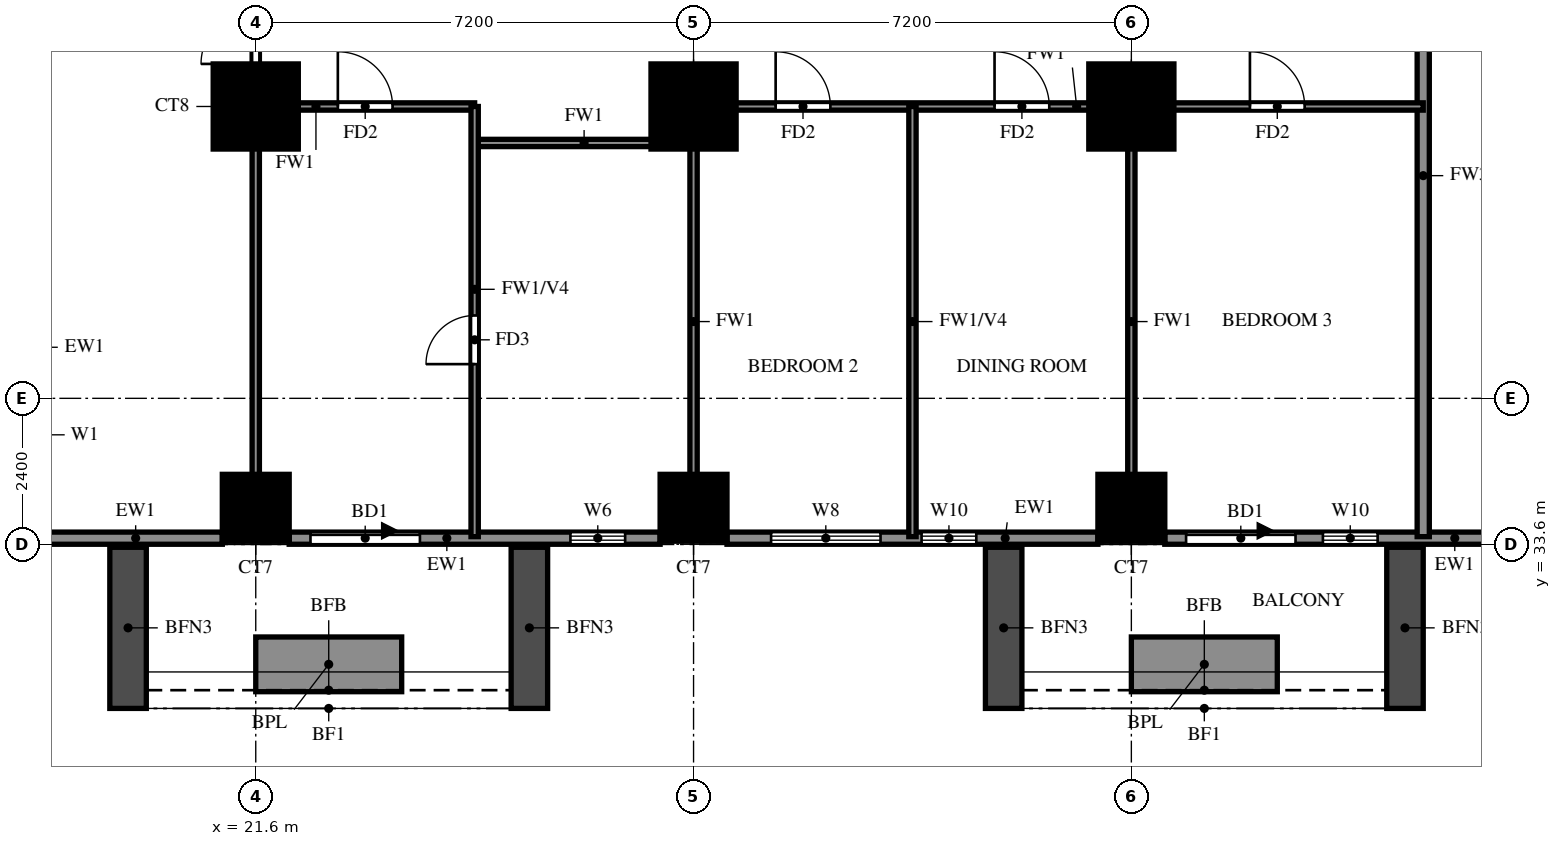
"""IFC4 building model, lengths in metres.
Left out: names, types, materials, properties, quantities, classifications, styles, units other than length and angle.
Written with IfcOpenShell. Run it as: python <this file> out.ifc"""

import sys

from ifc_helpers import new_model, si_unit, direction, frame, frame_2d, origin, origin_2d, place, context, subcontext, project, spatial, rectangle, extrude, source, transform, mapped, element, fill, save


model = new_model("IFC4")
c1 = context("Model", 3, precision=1e-05, world=origin(), true_north=direction((0.0, 1.0)))
c2 = subcontext(c1, "Body", "Model", "MODEL_VIEW")
j1 = project(units=[si_unit("LENGTHUNIT", "METRE"), si_unit("PLANEANGLEUNIT", "RADIAN")], contexts=[c1])
p1 = place(None, origin())
s1 = spatial("IfcSite", under=j1, at=p1, CompositionType="ELEMENT")
p2 = place(p1, origin())
s2 = spatial("IfcBuilding", under=s1, at=p2, CompositionType="ELEMENT")
p3 = place(p2, frame((0.0, 0.0, 41.0)))
s3 = spatial("IfcBuildingStorey", under=s2, at=p3, CompositionType="ELEMENT", Elevation=41.0)
m1 = source(origin(), c2, "Body", "SweptSolid", [
    extrude(rectangle(XDim=1.1, YDim=1.1, at=origin_2d()), origin(), (0.0, 0.0, 1.0), 3.18),
])
for number, where, z_axis, x_axis in (
    (1, (21.6, 34.2, 0.0), (0.0, 0.0, 1.0), (1.0, 0.0, 0.0)),
    (2, (28.8, 34.2, 0.0), (0.0, 0.0, 1.0), (1.0, 0.0, 0.0)),
    (3, (36.0, 34.2, 0.0), (0.0, 0.0, 1.0), (1.0, 0.0, 0.0)),
):
    element("IfcColumn", number, at=place(p3, frame(where, z_axis=z_axis, x_axis=x_axis)), inside=s3, PredefinedType="COLUMN", context=c2, shape_type="MappedRepresentation", body=[
        mapped(m1, transform((0.0, 0.0, 0.0))),
    ])
m2 = source(origin(), c2, "Body", "SweptSolid", [
    extrude(rectangle(XDim=1.4, YDim=1.4, at=origin_2d()), origin(), (0.0, 0.0, 1.0), 3.18),
])
for number, where, z_axis, x_axis in (
    (4, (21.6, 40.8, 0.0), (0.0, 0.0, 1.0), (1.0, 0.0, 0.0)),
    (5, (28.8, 40.8, 0.0), (0.0, 0.0, 1.0), (1.0, 0.0, 0.0)),
    (6, (36.0, 40.8, 0.0), (0.0, 0.0, 1.0), (1.0, 0.0, 0.0)),
):
    element("IfcColumn", number, at=place(p3, frame(where, z_axis=z_axis, x_axis=x_axis)), inside=s3, PredefinedType="COLUMN", context=c2, shape_type="MappedRepresentation", body=[
        mapped(m2, transform((0.0, 0.0, 0.0))),
    ])
p4 = place(p3, frame((18.2, 33.7, 0.0), z_axis=(0.0, 0.0, 1.0), x_axis=(1.0, 0.0, 0.0)))
e7 = element("IfcWall", 7, at=p4, inside=s3, PredefinedType="SOLIDWALL", context=c2, shape_type="SweptSolid", body=[
    extrude(rectangle(XDim=2.85, YDim=0.2, at=frame_2d((1.425, 0.0))), origin(), (0.0, 0.0, 1.0), 3.18),
])
p5 = place(p3, frame((22.15, 33.7, 0.0), z_axis=(0.0, 0.0, 1.0), x_axis=(1.0, 0.0, 0.0)))
e8 = element("IfcWall", 8, at=p5, inside=s3, PredefinedType="SOLIDWALL", context=c2, shape_type="SweptSolid", body=[
    extrude(rectangle(XDim=6.1, YDim=0.2, at=frame_2d((3.05, 0.0))), origin(), (0.0, 0.0, 1.0), 3.18),
])
p6 = place(p5, frame((0.35, 0.0, 0.0)))
e9 = element("IfcOpeningElement", 9, at=p6, cuts=e8, PredefinedType="OPENING", context=c2, shape_type="SweptSolid", body=[
    extrude(rectangle(XDim=1.8, YDim=2.4, at=frame_2d((0.9, 1.2))), frame((0.0, 0.11, 0.0), z_axis=(0.0, -1.0, 0.0), x_axis=(1.0, 0.0, 0.0)), (0.0, 0.0, 1.0), 0.22),
])
p7 = place(p5, frame((4.625, 0.0, 1.5)))
e10 = element("IfcOpeningElement", 10, at=p7, cuts=e8, PredefinedType="OPENING", context=c2, shape_type="SweptSolid", body=[
    extrude(rectangle(XDim=0.9, YDim=0.9, at=frame_2d((0.45, 0.45))), frame((0.0, 0.11, 0.0), z_axis=(0.0, -1.0, 0.0), x_axis=(1.0, 0.0, 0.0)), (0.0, 0.0, 1.0), 0.22),
])
p8 = place(p3, frame((29.35, 33.7, 0.0), z_axis=(0.0, 0.0, 1.0), x_axis=(1.0, 0.0, 0.0)))
e11 = element("IfcWall", 11, at=p8, inside=s3, PredefinedType="SOLIDWALL", context=c2, shape_type="SweptSolid", body=[
    extrude(rectangle(XDim=6.1, YDim=0.2, at=frame_2d((3.05, 0.0))), origin(), (0.0, 0.0, 1.0), 3.18),
])
p9 = place(p8, frame((0.725, 0.0, 0.6)))
e12 = element("IfcOpeningElement", 12, at=p9, cuts=e11, PredefinedType="OPENING", context=c2, shape_type="SweptSolid", body=[
    extrude(rectangle(XDim=1.8, YDim=2.4, at=frame_2d((0.9, 1.2))), frame((0.0, 0.11, 0.0), z_axis=(0.0, -1.0, 0.0), x_axis=(1.0, 0.0, 0.0)), (0.0, 0.0, 1.0), 0.22),
])
p10 = place(p8, frame((3.2, 0.0, 0.6)))
e13 = element("IfcOpeningElement", 13, at=p10, cuts=e11, PredefinedType="OPENING", context=c2, shape_type="SweptSolid", body=[
    extrude(rectangle(XDim=0.9, YDim=2.4, at=frame_2d((0.45, 1.2))), frame((0.0, 0.11, 0.0), z_axis=(0.0, -1.0, 0.0), x_axis=(1.0, 0.0, 0.0)), (0.0, 0.0, 1.0), 0.22),
])
p11 = place(p3, frame((36.55, 33.7, 0.0), z_axis=(0.0, 0.0, 1.0), x_axis=(1.0, 0.0, 0.0)))
e14 = element("IfcWall", 14, at=p11, inside=s3, PredefinedType="SOLIDWALL", context=c2, shape_type="SweptSolid", body=[
    extrude(rectangle(XDim=5.45, YDim=0.2, at=frame_2d((2.725, 0.0))), origin(), (0.0, 0.0, 1.0), 3.18),
])
p12 = place(p11, frame((0.35, 0.0, 0.0)))
e15 = element("IfcOpeningElement", 15, at=p12, cuts=e14, PredefinedType="OPENING", context=c2, shape_type="SweptSolid", body=[
    extrude(rectangle(XDim=1.8, YDim=2.4, at=frame_2d((0.9, 1.2))), frame((0.0, 0.11, 0.0), z_axis=(0.0, -1.0, 0.0), x_axis=(1.0, 0.0, 0.0)), (0.0, 0.0, 1.0), 0.22),
])
p13 = place(p11, frame((2.6, 0.0, 0.6)))
e16 = element("IfcOpeningElement", 16, at=p13, cuts=e14, PredefinedType="OPENING", context=c2, shape_type="SweptSolid", body=[
    extrude(rectangle(XDim=0.9, YDim=2.4, at=frame_2d((0.45, 1.2))), frame((0.0, 0.11, 0.0), z_axis=(0.0, -1.0, 0.0), x_axis=(1.0, 0.0, 0.0)), (0.0, 0.0, 1.0), 0.22),
])
for number, where, z_axis, x_axis in (
    (17, (19.5, 33.55, 0.0), (0.0, 0.0, 1.0), (0.0, -1.0, 0.0)),
    (18, (26.1, 33.55, 0.0), (0.0, 0.0, 1.0), (0.0, -1.0, 0.0)),
):
    element("IfcWall", number, at=place(p3, frame(where, z_axis=z_axis, x_axis=x_axis)), inside=s3, PredefinedType="SOLIDWALL", context=c2, shape_type="SweptSolid", body=[
        extrude(rectangle(XDim=2.65, YDim=0.6, at=frame_2d((1.325, 0.0))), origin(), (0.0, 0.0, 1.0), 2.85),
    ])
p14 = place(p3, frame((21.6, 31.625, 0.0), z_axis=(0.0, 0.0, 1.0), x_axis=(1.0, 0.0, 0.0)))
e19 = element("IfcWall", 19, at=p14, inside=s3, PredefinedType="SOLIDWALL", context=c2, shape_type="SweptSolid", body=[
    extrude(rectangle(XDim=2.4, YDim=0.9, at=frame_2d((1.2, 0.0))), origin(), (0.0, 0.0, 1.0), 0.9),
])
for number, where, z_axis, x_axis in (
    (20, (33.9, 33.55, 0.0), (0.0, 0.0, 1.0), (0.0, -1.0, 0.0)),
    (21, (40.5, 33.55, 0.0), (0.0, 0.0, 1.0), (0.0, -1.0, 0.0)),
):
    element("IfcWall", number, at=place(p3, frame(where, z_axis=z_axis, x_axis=x_axis)), inside=s3, PredefinedType="SOLIDWALL", context=c2, shape_type="SweptSolid", body=[
        extrude(rectangle(XDim=2.65, YDim=0.6, at=frame_2d((1.325, 0.0))), origin(), (0.0, 0.0, 1.0), 2.85),
    ])
p15 = place(p3, frame((36.0, 31.625, 0.0), z_axis=(0.0, 0.0, 1.0), x_axis=(1.0, 0.0, 0.0)))
e22 = element("IfcWall", 22, at=p15, inside=s3, PredefinedType="SOLIDWALL", context=c2, shape_type="SweptSolid", body=[
    extrude(rectangle(XDim=2.4, YDim=0.9, at=frame_2d((1.2, 0.0))), origin(), (0.0, 0.0, 1.0), 0.9),
])
p16 = place(p3, frame((40.8, 33.725, 0.0), z_axis=(0.0, 0.0, 1.0), x_axis=(0.0, 1.0, 0.0)))
e23 = element("IfcWall", 23, at=p16, inside=s3, PredefinedType="SOLIDWALL", context=c2, shape_type="SweptSolid", body=[
    extrude(rectangle(XDim=11.875, YDim=0.2, at=frame_2d((5.938, 0.0))), origin(), (0.0, 0.0, 1.0), 2.28),
])
p17 = place(p3, frame((25.2, 40.2, 0.0), z_axis=(0.0, 0.0, 1.0), x_axis=(1.0, 0.0, 0.0)))
e24 = element("IfcWall", 24, at=p17, inside=s3, PredefinedType="PARTITIONING", context=c2, shape_type="SweptSolid", body=[
    extrude(rectangle(XDim=3.6, YDim=0.12, at=frame_2d((1.8, 0.0))), origin(), (0.0, 0.0, 1.0), 3.18),
])
p18 = place(p3, frame((21.6, 40.8, 0.0), z_axis=(0.0, 0.0, 1.0), x_axis=(1.0, 0.0, 0.0)))
e25 = element("IfcWall", 25, at=p18, inside=s3, PredefinedType="PARTITIONING", context=c2, shape_type="SweptSolid", body=[
    extrude(rectangle(XDim=3.6, YDim=0.12, at=frame_2d((1.8, 0.0))), origin(), (0.0, 0.0, 1.0), 3.18),
])
p19 = place(p18, frame((1.35, 0.0, 0.0)))
e26 = element("IfcOpeningElement", 26, at=p19, cuts=e25, PredefinedType="OPENING", context=c2, shape_type="SweptSolid", body=[
    extrude(rectangle(XDim=0.9, YDim=2.1, at=frame_2d((0.45, 1.05))), frame((0.0, 0.07, 0.0), z_axis=(0.0, -1.0, 0.0), x_axis=(1.0, 0.0, 0.0)), (0.0, 0.0, 1.0), 0.14),
])
p20 = place(p3, frame((28.8, 40.8, 0.0), z_axis=(0.0, 0.0, 1.0), x_axis=(1.0, 0.0, 0.0)))
e27 = element("IfcWall", 27, at=p20, inside=s3, PredefinedType="PARTITIONING", context=c2, shape_type="SweptSolid", body=[
    extrude(rectangle(XDim=12.0, YDim=0.12, at=frame_2d((6.0, 0.0))), origin(), (0.0, 0.0, 1.0), 3.18),
])
p21 = place(p20, frame((1.35, 0.0, 0.0)))
e28 = element("IfcOpeningElement", 28, at=p21, cuts=e27, PredefinedType="OPENING", context=c2, shape_type="SweptSolid", body=[
    extrude(rectangle(XDim=0.9, YDim=2.1, at=frame_2d((0.45, 1.05))), frame((0.0, 0.07, 0.0), z_axis=(0.0, -1.0, 0.0), x_axis=(1.0, 0.0, 0.0)), (0.0, 0.0, 1.0), 0.14),
])
p22 = place(p20, frame((4.95, 0.0, 0.0)))
e29 = element("IfcOpeningElement", 29, at=p22, cuts=e27, PredefinedType="OPENING", context=c2, shape_type="SweptSolid", body=[
    extrude(rectangle(XDim=0.9, YDim=2.1, at=frame_2d((0.45, 1.05))), frame((0.0, 0.07, 0.0), z_axis=(0.0, -1.0, 0.0), x_axis=(1.0, 0.0, 0.0)), (0.0, 0.0, 1.0), 0.14),
])
p23 = place(p20, frame((9.15, 0.0, 0.0)))
e30 = element("IfcOpeningElement", 30, at=p23, cuts=e27, PredefinedType="OPENING", context=c2, shape_type="SweptSolid", body=[
    extrude(rectangle(XDim=0.9, YDim=2.1, at=frame_2d((0.45, 1.05))), frame((0.0, 0.07, 0.0), z_axis=(0.0, -1.0, 0.0), x_axis=(1.0, 0.0, 0.0)), (0.0, 0.0, 1.0), 0.14),
])
p24 = place(p3, frame((21.6, 33.725, 0.0), z_axis=(0.0, 0.0, 1.0), x_axis=(0.0, 1.0, 0.0)))
e31 = element("IfcWall", 31, at=p24, inside=s3, PredefinedType="PARTITIONING", context=c2, shape_type="SweptSolid", body=[
    extrude(rectangle(XDim=35.875, YDim=0.12, at=frame_2d((17.938, 0.0))), origin(), (0.0, 0.0, 1.0), 3.18),
])
p25 = place(p24, frame((7.775, 0.0, 0.0)))
e32 = element("IfcOpeningElement", 32, at=p25, cuts=e31, PredefinedType="OPENING", context=c2, shape_type="SweptSolid", body=[
    extrude(rectangle(XDim=0.9, YDim=2.1, at=frame_2d((0.45, 1.05))), frame((0.0, 0.07, 0.0), z_axis=(0.0, -1.0, 0.0), x_axis=(1.0, 0.0, 0.0)), (0.0, 0.0, 1.0), 0.14),
])
p26 = place(p24, frame((15.625, 0.0, 0.0)))
e33 = element("IfcOpeningElement", 33, at=p26, cuts=e31, PredefinedType="OPENING", context=c2, shape_type="SweptSolid", body=[
    extrude(rectangle(XDim=0.9, YDim=2.1, at=frame_2d((0.45, 1.05))), frame((0.0, 0.07, 0.0), z_axis=(0.0, -1.0, 0.0), x_axis=(1.0, 0.0, 0.0)), (0.0, 0.0, 1.0), 0.14),
])
p27 = place(p24, frame((22.225, 0.0, 0.0)))
e34 = element("IfcOpeningElement", 34, at=p27, cuts=e31, PredefinedType="OPENING", context=c2, shape_type="SweptSolid", body=[
    extrude(rectangle(XDim=1.5, YDim=2.1, at=frame_2d((0.75, 1.05))), frame((0.0, 0.07, 0.0), z_axis=(0.0, -1.0, 0.0), x_axis=(1.0, 0.0, 0.0)), (0.0, 0.0, 1.0), 0.14),
])
p28 = place(p24, frame((26.425, 0.0, 0.0)))
e35 = element("IfcOpeningElement", 35, at=p28, cuts=e31, PredefinedType="OPENING", context=c2, shape_type="SweptSolid", body=[
    extrude(rectangle(XDim=0.9, YDim=2.1, at=frame_2d((0.45, 1.05))), frame((0.0, 0.07, 0.0), z_axis=(0.0, -1.0, 0.0), x_axis=(1.0, 0.0, 0.0)), (0.0, 0.0, 1.0), 0.14),
])
p29 = place(p24, frame((31.825, 0.0, 0.0)))
e36 = element("IfcOpeningElement", 36, at=p29, cuts=e31, PredefinedType="OPENING", context=c2, shape_type="SweptSolid", body=[
    extrude(rectangle(XDim=0.9, YDim=2.1, at=frame_2d((0.45, 1.05))), frame((0.0, 0.07, 0.0), z_axis=(0.0, -1.0, 0.0), x_axis=(1.0, 0.0, 0.0)), (0.0, 0.0, 1.0), 0.14),
])
p30 = place(p3, frame((25.2, 33.725, 0.0), z_axis=(0.0, 0.0, 1.0), x_axis=(0.0, 1.0, 0.0)))
e37 = element("IfcWall", 37, at=p30, inside=s3, PredefinedType="PARTITIONING", context=c2, shape_type="SweptSolid", body=[
    extrude(rectangle(XDim=7.075, YDim=0.12, at=frame_2d((3.538, 0.0))), origin(), (0.0, 0.0, 1.0), 2.28),
])
p31 = place(p30, frame((2.837, 0.0, 0.0)))
e38 = element("IfcOpeningElement", 38, at=p31, cuts=e37, PredefinedType="OPENING", context=c2, shape_type="SweptSolid", body=[
    extrude(rectangle(XDim=0.8, YDim=2.1, at=frame_2d((0.4, 1.05))), frame((0.0, 0.07, 0.0), z_axis=(0.0, -1.0, 0.0), x_axis=(1.0, 0.0, 0.0)), (0.0, 0.0, 1.0), 0.14),
])
p32 = place(p3, frame((28.8, 33.725, 0.0), z_axis=(0.0, 0.0, 1.0), x_axis=(0.0, 1.0, 0.0)))
e39 = element("IfcWall", 39, at=p32, inside=s3, PredefinedType="PARTITIONING", context=c2, shape_type="SweptSolid", body=[
    extrude(rectangle(XDim=7.075, YDim=0.12, at=frame_2d((3.538, 0.0))), origin(), (0.0, 0.0, 1.0), 3.18),
])
p33 = place(p3, frame((32.4, 33.725, 0.0), z_axis=(0.0, 0.0, 1.0), x_axis=(0.0, 1.0, 0.0)))
e40 = element("IfcWall", 40, at=p33, inside=s3, PredefinedType="PARTITIONING", context=c2, shape_type="SweptSolid", body=[
    extrude(rectangle(XDim=7.075, YDim=0.12, at=frame_2d((3.538, 0.0))), origin(), (0.0, 0.0, 1.0), 2.28),
])
p34 = place(p3, frame((36.0, 33.725, 0.0), z_axis=(0.0, 0.0, 1.0), x_axis=(0.0, 1.0, 0.0)))
e41 = element("IfcWall", 41, at=p34, inside=s3, PredefinedType="PARTITIONING", context=c2, shape_type="SweptSolid", body=[
    extrude(rectangle(XDim=7.075, YDim=0.12, at=frame_2d((3.538, 0.0))), origin(), (0.0, 0.0, 1.0), 3.18),
])
p35 = place(p6, origin())
e42 = element("IfcDoor", 42, at=p35, inside=s3, OperationType="DOUBLE_DOOR_SLIDING", PredefinedType="DOOR", context=c2, shape_type="SweptSolid", body=[
    extrude(rectangle(XDim=1.8, YDim=2.4, at=frame_2d((0.9, 1.2))), frame((0.0, 0.025, 0.0), z_axis=(0.0, -1.0, 0.0), x_axis=(1.0, 0.0, 0.0)), (0.0, 0.0, 1.0), 0.05),
])
fill(e9, e42)
p36 = place(p7, origin())
e43 = element("IfcWindow", 43, at=p36, inside=s3, PartitioningType="SINGLE_PANEL", PredefinedType="WINDOW", context=c2, shape_type="SweptSolid", body=[
    extrude(rectangle(XDim=0.9, YDim=0.9, at=frame_2d((0.45, 0.45))), frame((0.0, 0.03, 0.0), z_axis=(0.0, -1.0, 0.0), x_axis=(1.0, 0.0, 0.0)), (0.0, 0.0, 1.0), 0.06),
])
fill(e10, e43)
p37 = place(p9, origin())
e44 = element("IfcWindow", 44, at=p37, inside=s3, PartitioningType="DOUBLE_PANEL_VERTICAL", PredefinedType="WINDOW", context=c2, shape_type="SweptSolid", body=[
    extrude(rectangle(XDim=1.8, YDim=2.4, at=frame_2d((0.9, 1.2))), frame((0.0, 0.03, 0.0), z_axis=(0.0, -1.0, 0.0), x_axis=(1.0, 0.0, 0.0)), (0.0, 0.0, 1.0), 0.06),
])
fill(e12, e44)
p38 = place(p10, origin())
e45 = element("IfcWindow", 45, at=p38, inside=s3, PartitioningType="SINGLE_PANEL", PredefinedType="WINDOW", context=c2, shape_type="SweptSolid", body=[
    extrude(rectangle(XDim=0.9, YDim=2.4, at=frame_2d((0.45, 1.2))), frame((0.0, 0.03, 0.0), z_axis=(0.0, -1.0, 0.0), x_axis=(1.0, 0.0, 0.0)), (0.0, 0.0, 1.0), 0.06),
])
fill(e13, e45)
p39 = place(p12, origin())
e46 = element("IfcDoor", 46, at=p39, inside=s3, OperationType="DOUBLE_DOOR_SLIDING", PredefinedType="DOOR", context=c2, shape_type="SweptSolid", body=[
    extrude(rectangle(XDim=1.8, YDim=2.4, at=frame_2d((0.9, 1.2))), frame((0.0, 0.025, 0.0), z_axis=(0.0, -1.0, 0.0), x_axis=(1.0, 0.0, 0.0)), (0.0, 0.0, 1.0), 0.05),
])
fill(e15, e46)
p40 = place(p13, origin())
e47 = element("IfcWindow", 47, at=p40, inside=s3, PartitioningType="SINGLE_PANEL", PredefinedType="WINDOW", context=c2, shape_type="SweptSolid", body=[
    extrude(rectangle(XDim=0.9, YDim=2.4, at=frame_2d((0.45, 1.2))), frame((0.0, 0.03, 0.0), z_axis=(0.0, -1.0, 0.0), x_axis=(1.0, 0.0, 0.0)), (0.0, 0.0, 1.0), 0.06),
])
fill(e16, e47)
p41 = place(p25, origin())
e48 = element("IfcDoor", 48, at=p41, inside=s3, OperationType="SINGLE_SWING_RIGHT", PredefinedType="DOOR", context=c2, shape_type="SweptSolid", body=[
    extrude(rectangle(XDim=0.9, YDim=2.1, at=frame_2d((0.45, 1.05))), frame((0.0, 0.025, 0.0), z_axis=(0.0, -1.0, 0.0), x_axis=(1.0, 0.0, 0.0)), (0.0, 0.0, 1.0), 0.05),
])
fill(e32, e48)
p42 = place(p19, origin())
e49 = element("IfcDoor", 49, at=p42, inside=s3, OperationType="SINGLE_SWING_LEFT", PredefinedType="DOOR", context=c2, shape_type="SweptSolid", body=[
    extrude(rectangle(XDim=0.9, YDim=2.1, at=frame_2d((0.45, 1.05))), frame((0.0, 0.025, 0.0), z_axis=(0.0, -1.0, 0.0), x_axis=(1.0, 0.0, 0.0)), (0.0, 0.0, 1.0), 0.05),
])
fill(e26, e49)
p43 = place(p31, origin())
e50 = element("IfcDoor", 50, at=p43, inside=s3, OperationType="SINGLE_SWING_RIGHT", PredefinedType="DOOR", context=c2, shape_type="SweptSolid", body=[
    extrude(rectangle(XDim=0.8, YDim=2.1, at=frame_2d((0.4, 1.05))), frame((0.0, 0.025, 0.0), z_axis=(0.0, -1.0, 0.0), x_axis=(1.0, 0.0, 0.0)), (0.0, 0.0, 1.0), 0.05),
])
fill(e38, e50)
p44 = place(p21, origin())
e51 = element("IfcDoor", 51, at=p44, inside=s3, OperationType="SINGLE_SWING_LEFT", PredefinedType="DOOR", context=c2, shape_type="SweptSolid", body=[
    extrude(rectangle(XDim=0.9, YDim=2.1, at=frame_2d((0.45, 1.05))), frame((0.0, 0.025, 0.0), z_axis=(0.0, -1.0, 0.0), x_axis=(1.0, 0.0, 0.0)), (0.0, 0.0, 1.0), 0.05),
])
fill(e28, e51)
p45 = place(p22, origin())
e52 = element("IfcDoor", 52, at=p45, inside=s3, OperationType="SINGLE_SWING_LEFT", PredefinedType="DOOR", context=c2, shape_type="SweptSolid", body=[
    extrude(rectangle(XDim=0.9, YDim=2.1, at=frame_2d((0.45, 1.05))), frame((0.0, 0.025, 0.0), z_axis=(0.0, -1.0, 0.0), x_axis=(1.0, 0.0, 0.0)), (0.0, 0.0, 1.0), 0.05),
])
fill(e29, e52)
p46 = place(p23, origin())
e53 = element("IfcDoor", 53, at=p46, inside=s3, OperationType="SINGLE_SWING_RIGHT", PredefinedType="DOOR", context=c2, shape_type="SweptSolid", body=[
    extrude(rectangle(XDim=0.9, YDim=2.1, at=frame_2d((0.45, 1.05))), frame((0.0, 0.025, 0.0), z_axis=(0.0, -1.0, 0.0), x_axis=(1.0, 0.0, 0.0)), (0.0, 0.0, 1.0), 0.05),
])
fill(e30, e53)
save(model, sys.argv[1])
